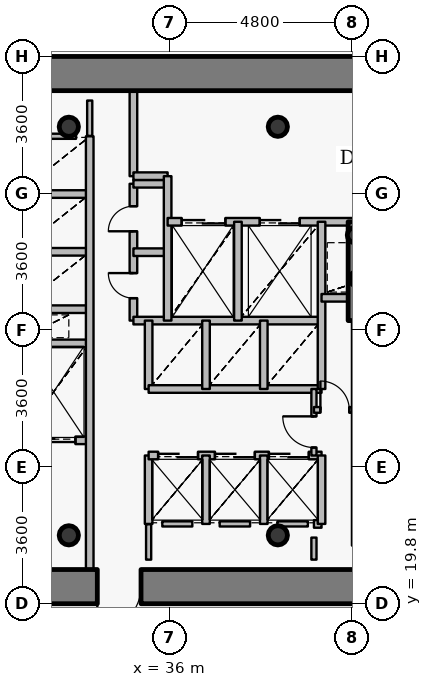
"""IFC4 building model, lengths in metres.
Left out: names, types, materials, properties, quantities, classifications, styles, units other than length and angle.
Written with IfcOpenShell. Run it as: python <this file> out.ifc"""

import sys

from ifc_helpers import new_model, si_unit, direction, frame, frame_2d, origin, origin_2d, place, context, subcontext, project, spatial, rectangle, hollow_circle, extrude, source, transform, mapped, element, fill, save


model = new_model("IFC4")
c1 = context("Model", 3, precision=1e-05, world=origin(), true_north=direction((0.0, 1.0)))
c2 = subcontext(c1, "Body", "Model", "MODEL_VIEW")
j1 = project(units=[si_unit("LENGTHUNIT", "METRE"), si_unit("PLANEANGLEUNIT", "RADIAN")], contexts=[c1])
p1 = place(None, origin())
s1 = spatial("IfcSite", under=j1, at=p1, CompositionType="ELEMENT")
p2 = place(p1, origin())
s2 = spatial("IfcBuilding", under=s1, at=p2, CompositionType="ELEMENT")
p3 = place(p2, frame((0.0, 0.0, 61.8)))
s3 = spatial("IfcBuildingStorey", under=s2, at=p3, CompositionType="ELEMENT", Elevation=61.8)
for number, where, z_axis, x_axis in (
    (1, (33.35, 21.6, 0.0), (0.0, 0.0, 1.0), (1.0, 0.0, 0.0)),
    (2, (38.85, 21.6, 0.0), (0.0, 0.0, 1.0), (1.0, 0.0, 0.0)),
    (3, (38.85, 32.35, 0.0), (0.0, 0.0, 1.0), (1.0, 0.0, 0.0)),
    (4, (33.35, 32.35, 0.0), (0.0, 0.0, 1.0), (1.0, 0.0, 0.0)),
):
    element("IfcColumn", number, at=place(p3, frame(where, z_axis=z_axis, x_axis=x_axis)), inside=s3, PredefinedType="COLUMN", context=c2, shape_type="SweptSolid", body=[
        extrude(hollow_circle(Radius=0.254, WallThickness=0.02, at=origin_2d()), origin(), (0.0, 0.0, 1.0), 4.2),
    ])
for number, where, z_axis, x_axis in (
    (5, (40.95, 28.35, 0.0), (0.0, 0.0, 1.0), (1.0, 0.0, 0.0)),
    (6, (40.88, 29.5, 0.0), (0.0, 0.0, 1.0), (1.0, 0.0, 0.0)),
):
    element("IfcColumn", number, at=place(p3, frame(where, z_axis=z_axis, x_axis=x_axis)), inside=s3, PredefinedType="COLUMN", context=c2, shape_type="SweptSolid", body=[
        extrude(hollow_circle(Radius=0.203, WallThickness=0.016, at=origin_2d()), origin(), (0.0, 0.0, 1.0), 4.2),
    ])
p4 = place(p3, frame((26.75, 33.75, 0.0), z_axis=(0.0, 0.0, 1.0), x_axis=(1.0, 0.0, 0.0)))
e7 = element("IfcWall", 7, at=p4, inside=s3, PredefinedType="SHEAR", context=c2, shape_type="SweptSolid", body=[
    extrude(rectangle(XDim=18.5, YDim=0.9, at=frame_2d((9.25, 0.0))), origin(), (0.0, 0.0, 1.0), 3.4),
])
p5 = place(p3, frame((45.25, 20.25, 0.0), z_axis=(0.0, 0.0, 1.0), x_axis=(-1.0, 0.0, 0.0)))
e8 = element("IfcWall", 8, at=p5, inside=s3, PredefinedType="SHEAR", context=c2, shape_type="SweptSolid", body=[
    extrude(rectangle(XDim=18.5, YDim=0.9, at=frame_2d((9.25, 0.0))), origin(), (0.0, 0.0, 1.0), 3.4),
])
p6 = place(p5, frame((10.0, 0.0, 0.0)))
e9 = element("IfcOpeningElement", 9, at=p6, cuts=e8, PredefinedType="OPENING", context=c2, shape_type="SweptSolid", body=[
    extrude(rectangle(XDim=1.15, YDim=2.15, at=origin_2d()), frame((0.575, 0.46, 1.075), z_axis=(0.0, -1.0, 0.0), x_axis=(1.0, 0.0, 0.0)), (0.0, 0.0, 1.0), 0.92),
])
p7 = place(p3, frame((40.9, 27.25, 0.0), z_axis=(0.0, 0.0, 1.0), x_axis=(0.0, 1.0, 0.0)))
e10 = element("IfcWall", 10, at=p7, inside=s3, PredefinedType="SHEAR", context=c2, shape_type="SweptSolid", body=[
    extrude(rectangle(XDim=2.6, YDim=0.4, at=frame_2d((1.3, 0.0))), origin(), (0.0, 0.0, 1.0), 3.55),
])
p8 = place(p3, frame((32.0, 24.1, 0.0), z_axis=(0.0, 0.0, 1.0), x_axis=(1.0, 0.0, 0.0)))
e11 = element("IfcWall", 11, at=p8, inside=s3, PredefinedType="PARTITIONING", context=c2, shape_type="SweptSolid", body=[
    extrude(rectangle(XDim=1.9, YDim=0.2, at=frame_2d((0.95, 0.0))), origin(), (0.0, 0.0, 1.0), 3.535),
])
p9 = place(p8, frame((0.375, 0.0, 0.0)))
e12 = element("IfcOpeningElement", 12, at=p9, cuts=e11, PredefinedType="OPENING", context=c2, shape_type="SweptSolid", body=[
    extrude(rectangle(XDim=1.15, YDim=2.15, at=origin_2d()), frame((0.575, 0.11, 1.075), z_axis=(0.0, -1.0, 0.0), x_axis=(1.0, 0.0, 0.0)), (0.0, 0.0, 1.0), 0.22),
])
for number, where, z_axis, x_axis in (
    (13, (32.0, 26.65, 0.0), (0.0, 0.0, 1.0), (1.0, 0.0, 0.0)),
    (14, (32.0, 27.55, 0.0), (0.0, 0.0, 1.0), (1.0, 0.0, 0.0)),
    (15, (32.0, 29.06, 0.0), (0.0, 0.0, 1.0), (1.0, 0.0, 0.0)),
    (16, (32.0, 30.58, 0.0), (0.0, 0.0, 1.0), (1.0, 0.0, 0.0)),
):
    element("IfcWall", number, at=place(p3, frame(where, z_axis=z_axis, x_axis=x_axis)), inside=s3, PredefinedType="PARTITIONING", context=c2, shape_type="SweptSolid", body=[
        extrude(rectangle(XDim=1.9, YDim=0.2, at=frame_2d((0.95, 0.0))), origin(), (0.0, 0.0, 1.0), 3.535),
    ])
p10 = place(p3, frame((33.9, 20.7, 0.0), z_axis=(0.0, 0.0, 1.0), x_axis=(0.0, 1.0, 0.0)))
e17 = element("IfcWall", 17, at=p10, inside=s3, PredefinedType="PARTITIONING", context=c2, shape_type="SweptSolid", body=[
    extrude(rectangle(XDim=11.4, YDim=0.2, at=frame_2d((5.7, 0.0))), origin(), (0.0, 0.0, 1.0), 3.535),
])
p11 = place(p3, frame((35.05, 27.25, 0.0), z_axis=(0.0, 0.0, 1.0), x_axis=(0.0, 1.0, 0.0)))
e18 = element("IfcWall", 18, at=p11, inside=s3, PredefinedType="PARTITIONING", context=c2, shape_type="SweptSolid", body=[
    extrude(rectangle(XDim=3.6, YDim=0.2, at=frame_2d((1.8, 0.0))), origin(), (0.0, 0.0, 1.0), 3.95),
])
p12 = place(p11, frame((0.59, 0.0, 0.0)))
e19 = element("IfcOpeningElement", 19, at=p12, cuts=e18, PredefinedType="OPENING", context=c2, shape_type="SweptSolid", body=[
    extrude(rectangle(XDim=0.66, YDim=2.05, at=origin_2d()), frame((0.33, 0.11, 1.025), z_axis=(0.0, -1.0, 0.0), x_axis=(1.0, 0.0, 0.0)), (0.0, 0.0, 1.0), 0.22),
])
p13 = place(p11, frame((2.35, 0.0, 0.0)))
e20 = element("IfcOpeningElement", 20, at=p13, cuts=e18, PredefinedType="OPENING", context=c2, shape_type="SweptSolid", body=[
    extrude(rectangle(XDim=0.66, YDim=2.05, at=origin_2d()), frame((0.33, 0.11, 1.025), z_axis=(0.0, -1.0, 0.0), x_axis=(1.0, 0.0, 0.0)), (0.0, 0.0, 1.0), 0.22),
])
p14 = place(p3, frame((35.05, 27.25, 0.0), z_axis=(0.0, 0.0, 1.0), x_axis=(1.0, 0.0, 0.0)))
e21 = element("IfcWall", 21, at=p14, inside=s3, PredefinedType="PARTITIONING", context=c2, shape_type="SweptSolid", body=[
    extrude(rectangle(XDim=4.95, YDim=0.2, at=frame_2d((2.475, 0.0))), origin(), (0.0, 0.0, 1.0), 3.535),
])
for number, where, z_axis, x_axis in (
    (22, (35.05, 29.05, 0.0), (0.0, 0.0, 1.0), (1.0, 0.0, 0.0)),
    (23, (35.05, 30.85, 0.0), (0.0, 0.0, 1.0), (1.0, 0.0, 0.0)),
):
    element("IfcWall", number, at=place(p3, frame(where, z_axis=z_axis, x_axis=x_axis)), inside=s3, PredefinedType="PARTITIONING", context=c2, shape_type="SweptSolid", body=[
        extrude(rectangle(XDim=0.9, YDim=0.2, at=frame_2d((0.45, 0.0))), origin(), (0.0, 0.0, 1.0), 3.95),
    ])
p15 = place(p3, frame((35.05, 31.05, 0.0), z_axis=(0.0, 0.0, 1.0), x_axis=(0.0, 1.0, 0.0)))
e24 = element("IfcWall", 24, at=p15, inside=s3, PredefinedType="PARTITIONING", context=c2, shape_type="SweptSolid", body=[
    extrude(rectangle(XDim=2.25, YDim=0.2, at=frame_2d((1.125, 0.0))), origin(), (0.0, 0.0, 1.0), 3.535),
])
p16 = place(p3, frame((35.05, 31.05, 0.0), z_axis=(0.0, 0.0, 1.0), x_axis=(1.0, 0.0, 0.0)))
e25 = element("IfcWall", 25, at=p16, inside=s3, PredefinedType="PARTITIONING", context=c2, shape_type="SweptSolid", body=[
    extrude(rectangle(XDim=0.9, YDim=0.2, at=frame_2d((0.45, 0.0))), origin(), (0.0, 0.0, 1.0), 3.95),
])
p17 = place(p3, frame((35.45, 21.9, 0.0), z_axis=(0.0, 0.0, 1.0), x_axis=(0.0, 1.0, 0.0)))
e26 = element("IfcWall", 26, at=p17, inside=s3, PredefinedType="PARTITIONING", context=c2, shape_type="SweptSolid", body=[
    extrude(rectangle(XDim=1.8, YDim=0.2, at=frame_2d((0.9, 0.0))), origin(), (0.0, 0.0, 1.0), 3.95),
])
p18 = place(p3, frame((35.45, 23.7, 0.0), z_axis=(0.0, 0.0, 1.0), x_axis=(1.0, 0.0, 0.0)))
e27 = element("IfcWall", 27, at=p18, inside=s3, PredefinedType="PARTITIONING", context=c2, shape_type="SweptSolid", body=[
    extrude(rectangle(XDim=4.55, YDim=0.2, at=frame_2d((2.275, 0.0))), origin(), (0.0, 0.0, 1.0), 3.535),
])
p19 = place(p18, frame((0.25, 0.0, 0.0)))
e28 = element("IfcOpeningElement", 28, at=p19, cuts=e27, PredefinedType="OPENING", context=c2, shape_type="SweptSolid", body=[
    extrude(rectangle(XDim=1.05, YDim=2.15, at=origin_2d()), frame((0.525, 0.11, 1.075), z_axis=(0.0, -1.0, 0.0), x_axis=(1.0, 0.0, 0.0)), (0.0, 0.0, 1.0), 0.22),
])
p20 = place(p18, frame((1.745, 0.0, 0.0)))
e29 = element("IfcOpeningElement", 29, at=p20, cuts=e27, PredefinedType="OPENING", context=c2, shape_type="SweptSolid", body=[
    extrude(rectangle(XDim=1.05, YDim=2.15, at=origin_2d()), frame((0.525, 0.11, 1.075), z_axis=(0.0, -1.0, 0.0), x_axis=(1.0, 0.0, 0.0)), (0.0, 0.0, 1.0), 0.22),
])
p21 = place(p18, frame((3.165, 0.0, 0.0)))
e30 = element("IfcOpeningElement", 30, at=p21, cuts=e27, PredefinedType="OPENING", context=c2, shape_type="SweptSolid", body=[
    extrude(rectangle(XDim=1.05, YDim=2.15, at=origin_2d()), frame((0.525, 0.11, 1.075), z_axis=(0.0, -1.0, 0.0), x_axis=(1.0, 0.0, 0.0)), (0.0, 0.0, 1.0), 0.22),
])
p22 = place(p3, frame((35.45, 25.45, 0.0), z_axis=(0.0, 0.0, 1.0), x_axis=(0.0, 1.0, 0.0)))
e31 = element("IfcWall", 31, at=p22, inside=s3, PredefinedType="PARTITIONING", context=c2, shape_type="SweptSolid", body=[
    extrude(rectangle(XDim=1.8, YDim=0.2, at=frame_2d((0.9, 0.0))), origin(), (0.0, 0.0, 1.0), 3.95),
])
p23 = place(p3, frame((35.45, 25.45, 0.0), z_axis=(0.0, 0.0, 1.0), x_axis=(1.0, 0.0, 0.0)))
e32 = element("IfcWall", 32, at=p23, inside=s3, PredefinedType="PARTITIONING", context=c2, shape_type="SweptSolid", body=[
    extrude(rectangle(XDim=4.55, YDim=0.2, at=frame_2d((2.275, 0.0))), origin(), (0.0, 0.0, 1.0), 3.535),
])
p24 = place(p3, frame((35.95, 27.25, 0.0), z_axis=(0.0, 0.0, 1.0), x_axis=(0.0, 1.0, 0.0)))
e33 = element("IfcWall", 33, at=p24, inside=s3, PredefinedType="PARTITIONING", context=c2, shape_type="SweptSolid", body=[
    extrude(rectangle(XDim=3.8, YDim=0.2, at=frame_2d((1.9, 0.0))), origin(), (0.0, 0.0, 1.0), 3.95),
])
p25 = place(p3, frame((35.95, 29.85, 0.0), z_axis=(0.0, 0.0, 1.0), x_axis=(1.0, 0.0, 0.0)))
e34 = element("IfcWall", 34, at=p25, inside=s3, PredefinedType="PARTITIONING", context=c2, shape_type="SweptSolid", body=[
    extrude(rectangle(XDim=8.49, YDim=0.2, at=frame_2d((4.245, 0.0))), origin(), (0.0, 0.0, 1.0), 3.535),
])
p26 = place(p25, frame((6.1, 0.0, 0.0)))
e35 = element("IfcOpeningElement", 35, at=p26, cuts=e34, PredefinedType="OPENING", context=c2, shape_type="SweptSolid", body=[
    extrude(rectangle(XDim=1.2, YDim=2.15, at=origin_2d()), frame((0.6, 0.11, 1.075), z_axis=(0.0, -1.0, 0.0), x_axis=(1.0, 0.0, 0.0)), (0.0, 0.0, 1.0), 0.22),
])
p27 = place(p25, frame((0.37, 0.0, 0.0)))
e36 = element("IfcOpeningElement", 36, at=p27, cuts=e34, PredefinedType="OPENING", context=c2, shape_type="SweptSolid", body=[
    extrude(rectangle(XDim=1.15, YDim=2.15, at=origin_2d()), frame((0.575, 0.11, 1.075), z_axis=(0.0, -1.0, 0.0), x_axis=(1.0, 0.0, 0.0)), (0.0, 0.0, 1.0), 0.22),
])
p28 = place(p25, frame((2.425, 0.0, 0.0)))
e37 = element("IfcOpeningElement", 37, at=p28, cuts=e34, PredefinedType="OPENING", context=c2, shape_type="SweptSolid", body=[
    extrude(rectangle(XDim=1.05, YDim=2.15, at=origin_2d()), frame((0.525, 0.11, 1.075), z_axis=(0.0, -1.0, 0.0), x_axis=(1.0, 0.0, 0.0)), (0.0, 0.0, 1.0), 0.22),
])
for number, where, z_axis, x_axis in (
    (38, (36.96, 21.9, 0.0), (0.0, 0.0, 1.0), (0.0, 1.0, 0.0)),
    (39, (36.96, 25.45, 0.0), (0.0, 0.0, 1.0), (0.0, 1.0, 0.0)),
):
    element("IfcWall", number, at=place(p3, frame(where, z_axis=z_axis, x_axis=x_axis)), inside=s3, PredefinedType="PARTITIONING", context=c2, shape_type="SweptSolid", body=[
        extrude(rectangle(XDim=1.8, YDim=0.2, at=frame_2d((0.9, 0.0))), origin(), (0.0, 0.0, 1.0), 3.95),
    ])
p29 = place(p3, frame((37.8, 27.25, 0.0), z_axis=(0.0, 0.0, 1.0), x_axis=(0.0, 1.0, 0.0)))
e40 = element("IfcWall", 40, at=p29, inside=s3, PredefinedType="PARTITIONING", context=c2, shape_type="SweptSolid", body=[
    extrude(rectangle(XDim=2.6, YDim=0.2, at=frame_2d((1.3, 0.0))), origin(), (0.0, 0.0, 1.0), 3.95),
])
for number, where, z_axis, x_axis in (
    (41, (38.48, 21.9, 0.0), (0.0, 0.0, 1.0), (0.0, 1.0, 0.0)),
    (42, (38.48, 25.45, 0.0), (0.0, 0.0, 1.0), (0.0, 1.0, 0.0)),
):
    element("IfcWall", number, at=place(p3, frame(where, z_axis=z_axis, x_axis=x_axis)), inside=s3, PredefinedType="PARTITIONING", context=c2, shape_type="SweptSolid", body=[
        extrude(rectangle(XDim=1.8, YDim=0.2, at=frame_2d((0.9, 0.0))), origin(), (0.0, 0.0, 1.0), 3.95),
    ])
p30 = place(p3, frame((39.8, 21.9, 0.0), z_axis=(0.0, 0.0, 1.0), x_axis=(1.0, 0.0, 0.0)))
e43 = element("IfcWall", 43, at=p30, inside=s3, PredefinedType="PARTITIONING", context=c2, shape_type="SweptSolid", body=[
    extrude(rectangle(XDim=0.2, YDim=0.2, at=frame_2d((0.1, 0.0))), origin(), (0.0, 0.0, 1.0), 3.95),
])
p31 = place(p3, frame((39.8, 23.7, 0.0), z_axis=(0.0, 0.0, 1.0), x_axis=(0.0, 1.0, 0.0)))
e44 = element("IfcWall", 44, at=p31, inside=s3, PredefinedType="PARTITIONING", context=c2, shape_type="SweptSolid", body=[
    extrude(rectangle(XDim=1.75, YDim=0.135, at=frame_2d((0.875, 0.0))), origin(), (0.0, 0.0, 1.0), 3.95),
])
p32 = place(p31, frame((0.21, 0.0, 0.0)))
e45 = element("IfcOpeningElement", 45, at=p32, cuts=e44, PredefinedType="OPENING", context=c2, shape_type="SweptSolid", body=[
    extrude(rectangle(XDim=0.82, YDim=2.1, at=origin_2d()), frame((0.41, 0.078, 1.05), z_axis=(0.0, -1.0, 0.0), x_axis=(1.0, 0.0, 0.0)), (0.0, 0.0, 1.0), 0.155),
])
p33 = place(p3, frame((39.8, 24.9, 0.0), z_axis=(0.0, 0.0, 1.0), x_axis=(1.0, 0.0, 0.0)))
e46 = element("IfcWall", 46, at=p33, inside=s3, PredefinedType="PARTITIONING", context=c2, shape_type="SweptSolid", body=[
    extrude(rectangle(XDim=1.1, YDim=0.15, at=frame_2d((0.55, 0.0))), origin(), (0.0, 0.0, 1.0), 3.95),
])
p34 = place(p33, frame((0.17, 0.0, 0.0)))
e47 = element("IfcOpeningElement", 47, at=p34, cuts=e46, PredefinedType="OPENING", context=c2, shape_type="SweptSolid", body=[
    extrude(rectangle(XDim=0.76, YDim=2.1, at=origin_2d()), frame((0.38, 0.085, 1.05), z_axis=(0.0, -1.0, 0.0), x_axis=(1.0, 0.0, 0.0)), (0.0, 0.0, 1.0), 0.17),
])
p35 = place(p3, frame((40.0, 21.9, 0.0), z_axis=(0.0, 0.0, 1.0), x_axis=(0.0, 1.0, 0.0)))
e48 = element("IfcWall", 48, at=p35, inside=s3, PredefinedType="PARTITIONING", context=c2, shape_type="SweptSolid", body=[
    extrude(rectangle(XDim=1.8, YDim=0.2, at=frame_2d((0.9, 0.0))), origin(), (0.0, 0.0, 1.0), 3.95),
])
p36 = place(p3, frame((40.0, 25.45, 0.0), z_axis=(0.0, 0.0, 1.0), x_axis=(0.0, 1.0, 0.0)))
e49 = element("IfcWall", 49, at=p36, inside=s3, PredefinedType="PARTITIONING", context=c2, shape_type="SweptSolid", body=[
    extrude(rectangle(XDim=4.4, YDim=0.2, at=frame_2d((2.2, 0.0))), origin(), (0.0, 0.0, 1.0), 3.95),
])
p37 = place(p3, frame((40.0, 27.85, 0.0), z_axis=(0.0, 0.0, 1.0), x_axis=(1.0, 0.0, 0.0)))
e50 = element("IfcWall", 50, at=p37, inside=s3, PredefinedType="PARTITIONING", context=c2, shape_type="SweptSolid", body=[
    extrude(rectangle(XDim=0.9, YDim=0.2, at=frame_2d((0.45, 0.0))), origin(), (0.0, 0.0, 1.0), 3.95),
])
p38 = place(p3, frame((40.9, 21.33, 0.0), z_axis=(0.0, 0.0, 1.0), x_axis=(0.0, 1.0, 0.0)))
e51 = element("IfcWall", 51, at=p38, inside=s3, PredefinedType="PARTITIONING", context=c2, shape_type="SweptSolid", body=[
    extrude(rectangle(XDim=5.91, YDim=0.2, at=frame_2d((2.955, 0.0))), origin(), (0.0, 0.0, 1.0), 3.485),
])
p39 = place(p3, frame((36.6, 21.9, 0.0), z_axis=(0.0, 0.0, 1.0), x_axis=(-1.0, 0.0, 0.0)))
e52 = element("IfcWall", 52, at=p39, inside=s3, PredefinedType="PARTITIONING", context=c2, shape_type="SweptSolid", body=[
    extrude(rectangle(XDim=0.79, YDim=0.135, at=frame_2d((0.395, 0.0))), origin(), (0.0, 0.0, 1.0), 3.95),
])
p40 = place(p3, frame((38.12, 21.9, 0.0), z_axis=(0.0, 0.0, 1.0), x_axis=(-1.0, 0.0, 0.0)))
e53 = element("IfcWall", 53, at=p40, inside=s3, PredefinedType="PARTITIONING", context=c2, shape_type="SweptSolid", body=[
    extrude(rectangle(XDim=0.8, YDim=0.135, at=frame_2d((0.4, 0.0))), origin(), (0.0, 0.0, 1.0), 3.95),
])
p41 = place(p3, frame((39.64, 21.9, 0.0), z_axis=(0.0, 0.0, 1.0), x_axis=(-1.0, 0.0, 0.0)))
e54 = element("IfcWall", 54, at=p41, inside=s3, PredefinedType="PARTITIONING", context=c2, shape_type="SweptSolid", body=[
    extrude(rectangle(XDim=0.8, YDim=0.135, at=frame_2d((0.4, 0.0))), origin(), (0.0, 0.0, 1.0), 3.535),
])
p42 = place(p3, frame((32.36, 32.1, 0.0), z_axis=(0.0, 0.0, 1.0), x_axis=(1.0, 0.0, 0.0)))
e55 = element("IfcWall", 55, at=p42, inside=s3, PredefinedType="PARTITIONING", context=c2, shape_type="SweptSolid", body=[
    extrude(rectangle(XDim=1.18, YDim=0.135, at=frame_2d((0.59, 0.0))), origin(), (0.0, 0.0, 1.0), 3.535),
])
p43 = place(p3, frame((39.8, 20.96, 0.0), z_axis=(0.0, 0.0, 1.0), x_axis=(0.0, 1.0, 0.0)))
e56 = element("IfcWall", 56, at=p43, inside=s3, PredefinedType="PARTITIONING", context=c2, shape_type="SweptSolid", body=[
    extrude(rectangle(XDim=0.58, YDim=0.135, at=frame_2d((0.29, 0.0))), origin(), (0.0, 0.0, 1.0), 3.485),
])
for number, where, z_axis, x_axis in (
    (57, (35.45, 21.89, 0.0), (0.0, 0.0, 1.0), (0.0, -1.0, 0.0)),
    (58, (33.9, 32.11, 0.0), (0.0, 0.0, 1.0), (0.0, 1.0, 0.0)),
):
    element("IfcWall", number, at=place(p3, frame(where, z_axis=z_axis, x_axis=x_axis)), inside=s3, PredefinedType="PARTITIONING", context=c2, shape_type="SweptSolid", body=[
        extrude(rectangle(XDim=0.93, YDim=0.135, at=frame_2d((0.465, 0.0))), origin(), (0.0, 0.0, 1.0), 3.535),
    ])
m1 = source(origin(), c2, "Body", "SweptSolid", [
    extrude(rectangle(XDim=1.15, YDim=2.15, at=origin_2d()), frame((0.575, 0.025, 1.075), z_axis=(0.0, -1.0, 0.0), x_axis=(1.0, 0.0, 0.0)), (0.0, 0.0, 1.0), 0.05),
])
p44 = place(p6, origin())
e59 = element("IfcDoor", 59, at=p44, inside=s3, OperationType="SINGLE_SWING_RIGHT", PredefinedType="DOOR", context=c2, shape_type="MappedRepresentation", body=[
    mapped(m1, transform((0.0, 0.0, 0.0), x_axis=(1.0, 0.0, 0.0), y_axis=(0.0, 1.0, 0.0), z_axis=(0.0, 0.0, 1.0), scale=1.0)),
])
fill(e9, e59)
m2 = source(origin(), c2, "Body", "SweptSolid", [
    extrude(rectangle(XDim=1.15, YDim=2.15, at=origin_2d()), frame((0.575, 0.025, 1.075), z_axis=(0.0, -1.0, 0.0), x_axis=(1.0, 0.0, 0.0)), (0.0, 0.0, 1.0), 0.05),
])
p45 = place(p27, origin())
e60 = element("IfcDoor", 60, at=p45, inside=s3, OperationType="DOUBLE_DOOR_SLIDING", PredefinedType="USERDEFINED", context=c2, shape_type="MappedRepresentation", body=[
    mapped(m2, transform((0.0, 0.0, 0.0), x_axis=(1.0, 0.0, 0.0), y_axis=(0.0, 1.0, 0.0), z_axis=(0.0, 0.0, 1.0), scale=1.0)),
])
fill(e36, e60)
p46 = place(p9, origin())
e61 = element("IfcDoor", 61, at=p46, inside=s3, OperationType="DOUBLE_DOOR_SLIDING", PredefinedType="USERDEFINED", context=c2, shape_type="MappedRepresentation", body=[
    mapped(m2, transform((0.0, 0.0, 0.0), x_axis=(1.0, 0.0, 0.0), y_axis=(0.0, 1.0, 0.0), z_axis=(0.0, 0.0, 1.0), scale=1.0)),
])
fill(e12, e61)
m3 = source(origin(), c2, "Body", "SweptSolid", [
    extrude(rectangle(XDim=1.05, YDim=2.15, at=origin_2d()), frame((0.525, 0.025, 1.075), z_axis=(0.0, -1.0, 0.0), x_axis=(1.0, 0.0, 0.0)), (0.0, 0.0, 1.0), 0.05),
])
p47 = place(p28, origin())
e62 = element("IfcDoor", 62, at=p47, inside=s3, OperationType="DOUBLE_DOOR_SLIDING", PredefinedType="USERDEFINED", context=c2, shape_type="MappedRepresentation", body=[
    mapped(m3, transform((0.0, 0.0, 0.0), x_axis=(1.0, 0.0, 0.0), y_axis=(0.0, 1.0, 0.0), z_axis=(0.0, 0.0, 1.0), scale=1.0)),
])
fill(e37, e62)
p48 = place(p19, origin())
e63 = element("IfcDoor", 63, at=p48, inside=s3, OperationType="DOUBLE_DOOR_SLIDING", PredefinedType="USERDEFINED", context=c2, shape_type="MappedRepresentation", body=[
    mapped(m3, transform((0.0, 0.0, 0.0), x_axis=(1.0, 0.0, 0.0), y_axis=(0.0, 1.0, 0.0), z_axis=(0.0, 0.0, 1.0), scale=1.0)),
])
fill(e28, e63)
p49 = place(p20, origin())
e64 = element("IfcDoor", 64, at=p49, inside=s3, OperationType="DOUBLE_DOOR_SLIDING", PredefinedType="USERDEFINED", context=c2, shape_type="MappedRepresentation", body=[
    mapped(m3, transform((0.0, 0.0, 0.0), x_axis=(1.0, 0.0, 0.0), y_axis=(0.0, 1.0, 0.0), z_axis=(0.0, 0.0, 1.0), scale=1.0)),
])
fill(e29, e64)
p50 = place(p21, origin())
e65 = element("IfcDoor", 65, at=p50, inside=s3, OperationType="DOUBLE_DOOR_SLIDING", PredefinedType="USERDEFINED", context=c2, shape_type="MappedRepresentation", body=[
    mapped(m3, transform((0.0, 0.0, 0.0), x_axis=(1.0, 0.0, 0.0), y_axis=(0.0, 1.0, 0.0), z_axis=(0.0, 0.0, 1.0), scale=1.0)),
])
fill(e30, e65)
m4 = source(origin(), c2, "Body", "SweptSolid", [
    extrude(rectangle(XDim=0.66, YDim=2.05, at=origin_2d()), frame((0.33, 0.025, 1.025), z_axis=(0.0, -1.0, 0.0), x_axis=(1.0, 0.0, 0.0)), (0.0, 0.0, 1.0), 0.05),
])
p51 = place(p12, origin())
e66 = element("IfcDoor", 66, at=p51, inside=s3, OperationType="SINGLE_SWING_RIGHT", PredefinedType="USERDEFINED", context=c2, shape_type="MappedRepresentation", body=[
    mapped(m4, transform((0.0, 0.0, 0.0), x_axis=(1.0, 0.0, 0.0), y_axis=(0.0, 1.0, 0.0), z_axis=(0.0, 0.0, 1.0), scale=1.0)),
])
fill(e19, e66)
p52 = place(p13, origin())
e67 = element("IfcDoor", 67, at=p52, inside=s3, OperationType="SINGLE_SWING_LEFT", PredefinedType="USERDEFINED", context=c2, shape_type="MappedRepresentation", body=[
    mapped(m4, transform((0.0, 0.0, 0.0), x_axis=(1.0, 0.0, 0.0), y_axis=(0.0, 1.0, 0.0), z_axis=(0.0, 0.0, 1.0), scale=1.0)),
])
fill(e20, e67)
m5 = source(origin(), c2, "Body", "SweptSolid", [
    extrude(rectangle(XDim=0.82, YDim=2.1, at=origin_2d()), frame((0.41, 0.025, 1.05), z_axis=(0.0, -1.0, 0.0), x_axis=(1.0, 0.0, 0.0)), (0.0, 0.0, 1.0), 0.05),
])
p53 = place(p32, origin())
e68 = element("IfcDoor", 68, at=p53, inside=s3, OperationType="SINGLE_SWING_RIGHT", PredefinedType="DOOR", context=c2, shape_type="MappedRepresentation", body=[
    mapped(m5, transform((0.0, 0.0, 0.0), x_axis=(1.0, 0.0, 0.0), y_axis=(0.0, 1.0, 0.0), z_axis=(0.0, 0.0, 1.0), scale=1.0)),
])
fill(e45, e68)
m6 = source(origin(), c2, "Body", "SweptSolid", [
    extrude(rectangle(XDim=0.76, YDim=2.1, at=origin_2d()), frame((0.38, 0.025, 1.05), z_axis=(0.0, -1.0, 0.0), x_axis=(1.0, 0.0, 0.0)), (0.0, 0.0, 1.0), 0.05),
])
p54 = place(p34, origin())
e69 = element("IfcDoor", 69, at=p54, inside=s3, OperationType="SINGLE_SWING_LEFT", PredefinedType="DOOR", context=c2, shape_type="MappedRepresentation", body=[
    mapped(m6, transform((0.0, 0.0, 0.0), x_axis=(1.0, 0.0, 0.0), y_axis=(0.0, 1.0, 0.0), z_axis=(0.0, 0.0, 1.0), scale=1.0)),
])
fill(e47, e69)
save(model, sys.argv[1])
